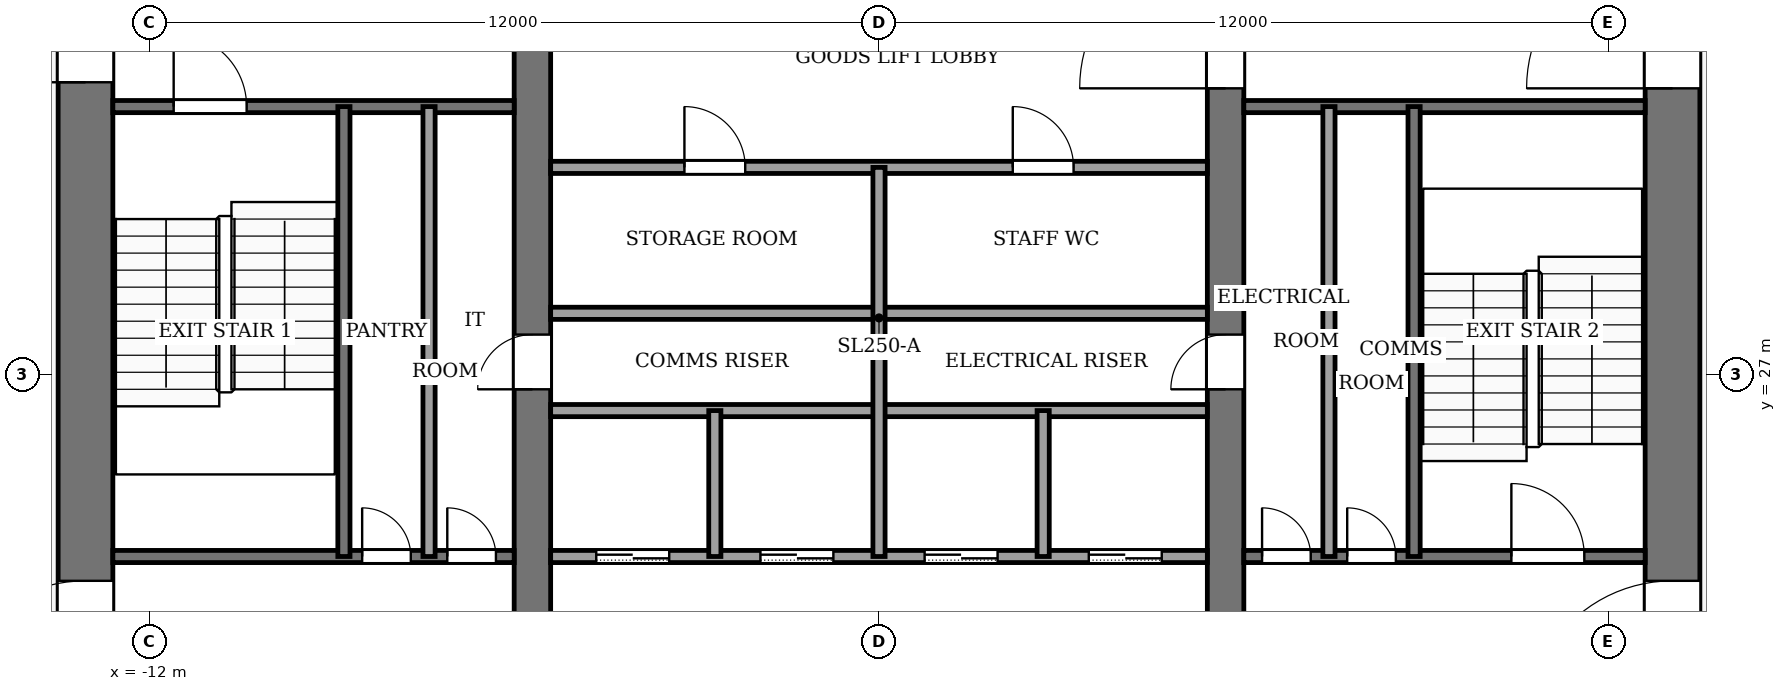
"""IFC4 building model, lengths in metres.
Left out: names, types, materials, properties, quantities, classifications, styles, units other than length and angle.
Written with IfcOpenShell. Run it as: python <this file> out.ifc"""

import sys

from ifc_helpers import new_model, si_unit, direction, frame, frame_2d, origin, place, context, subcontext, project, spatial, rectangle, extrude, element, fill, save


model = new_model("IFC4")
c1 = context("Model", 3, precision=1e-05, world=origin(), true_north=direction((0.0, 1.0)))
c2 = subcontext(c1, "Body", "Model", "MODEL_VIEW")
j1 = project(units=[si_unit("LENGTHUNIT", "METRE"), si_unit("PLANEANGLEUNIT", "RADIAN")], contexts=[c1])
p1 = place(None, origin())
s1 = spatial("IfcSite", under=j1, at=p1, CompositionType="ELEMENT")
p2 = place(p1, origin())
s2 = spatial("IfcBuilding", under=s1, at=p2, CompositionType="ELEMENT")
p3 = place(p2, frame((0.0, 0.0, 218.0)))
s3 = spatial("IfcBuildingStorey", under=s2, at=p3, CompositionType="ELEMENT", Elevation=218.0)
p4 = place(p3, frame((-13.05, 18.4, -0.13), z_axis=(0.0, 0.0, 1.0), x_axis=(0.0, 1.0, 0.0)))
e1 = element("IfcWall", 1, at=p4, inside=s3, PredefinedType="SHEAR", context=c2, shape_type="SweptSolid", body=[
    extrude(rectangle(XDim=19.2, YDim=0.9, at=frame_2d((9.6, 0.0))), origin(), (0.0, 0.0, 1.0), 4.0),
])
p5 = place(p4, frame((2.8, 0.0, 0.13)))
e2 = element("IfcOpeningElement", 2, at=p5, cuts=e1, PredefinedType="OPENING", context=c2, shape_type="SweptSolid", body=[
    extrude(rectangle(XDim=2.4, YDim=2.4, at=frame_2d((1.2, 1.2))), frame((0.0, 0.46, 0.0), z_axis=(0.0, -1.0, 0.0), x_axis=(1.0, 0.0, 0.0)), (0.0, 0.0, 1.0), 0.92),
])
p6 = place(p4, frame((13.4, 0.0, 0.13)))
e3 = element("IfcOpeningElement", 3, at=p6, cuts=e1, PredefinedType="OPENING", context=c2, shape_type="SweptSolid", body=[
    extrude(rectangle(XDim=1.4, YDim=2.2, at=frame_2d((0.7, 1.1))), frame((0.0, 0.46, 0.0), z_axis=(0.0, -1.0, 0.0), x_axis=(1.0, 0.0, 0.0)), (0.0, 0.0, 1.0), 0.92),
])
p7 = place(p3, frame((13.05, 18.4, -0.13), z_axis=(0.0, 0.0, 1.0), x_axis=(0.0, 1.0, 0.0)))
e4 = element("IfcWall", 4, at=p7, inside=s3, PredefinedType="SHEAR", context=c2, shape_type="SweptSolid", body=[
    extrude(rectangle(XDim=19.2, YDim=0.9, at=frame_2d((9.6, 0.0))), origin(), (0.0, 0.0, 1.0), 4.0),
])
p8 = place(p7, frame((2.8, 0.0, 0.13)))
e5 = element("IfcOpeningElement", 5, at=p8, cuts=e4, PredefinedType="OPENING", context=c2, shape_type="SweptSolid", body=[
    extrude(rectangle(XDim=2.4, YDim=2.4, at=frame_2d((1.2, 1.2))), frame((0.0, 0.46, 0.0), z_axis=(0.0, -1.0, 0.0), x_axis=(1.0, 0.0, 0.0)), (0.0, 0.0, 1.0), 0.92),
])
p9 = place(p7, frame((13.3, 0.0, 0.13)))
e6 = element("IfcOpeningElement", 6, at=p9, cuts=e4, PredefinedType="OPENING", context=c2, shape_type="SweptSolid", body=[
    extrude(rectangle(XDim=2.4, YDim=2.4, at=frame_2d((1.2, 1.2))), frame((0.0, 0.46, 0.0), z_axis=(0.0, -1.0, 0.0), x_axis=(1.0, 0.0, 0.0)), (0.0, 0.0, 1.0), 0.92),
])
p10 = place(p3, frame((-5.7, 18.4, -0.13), z_axis=(0.0, 0.0, 1.0), x_axis=(0.0, 1.0, 0.0)))
e7 = element("IfcWall", 7, at=p10, inside=s3, PredefinedType="SHEAR", context=c2, shape_type="SweptSolid", body=[
    extrude(rectangle(XDim=19.2, YDim=0.6, at=frame_2d((9.6, 0.0))), origin(), (0.0, 0.0, 1.0), 4.0),
])
p11 = place(p10, frame((8.35, 0.0, 0.13)))
e8 = element("IfcOpeningElement", 8, at=p11, cuts=e7, PredefinedType="OPENING", context=c2, shape_type="SweptSolid", body=[
    extrude(rectangle(XDim=0.9, YDim=2.1, at=frame_2d((0.45, 1.05))), frame((0.0, 0.31, 0.0), z_axis=(0.0, -1.0, 0.0), x_axis=(1.0, 0.0, 0.0)), (0.0, 0.0, 1.0), 0.62),
])
p12 = place(p3, frame((5.7, 18.4, -0.13), z_axis=(0.0, 0.0, 1.0), x_axis=(0.0, 1.0, 0.0)))
e9 = element("IfcWall", 9, at=p12, inside=s3, PredefinedType="SHEAR", context=c2, shape_type="SweptSolid", body=[
    extrude(rectangle(XDim=19.2, YDim=0.6, at=frame_2d((9.6, 0.0))), origin(), (0.0, 0.0, 1.0), 4.0),
])
p13 = place(p12, frame((8.35, 0.0, 0.13)))
e10 = element("IfcOpeningElement", 10, at=p13, cuts=e9, PredefinedType="OPENING", context=c2, shape_type="SweptSolid", body=[
    extrude(rectangle(XDim=0.9, YDim=2.1, at=frame_2d((0.45, 1.05))), frame((0.0, 0.31, 0.0), z_axis=(0.0, -1.0, 0.0), x_axis=(1.0, 0.0, 0.0)), (0.0, 0.0, 1.0), 0.62),
])
p14 = place(p12, frame((13.3, 0.0, 0.13)))
e11 = element("IfcOpeningElement", 11, at=p14, cuts=e9, PredefinedType="OPENING", context=c2, shape_type="SweptSolid", body=[
    extrude(rectangle(XDim=2.4, YDim=2.4, at=frame_2d((1.2, 1.2))), frame((0.0, 0.31, 0.0), z_axis=(0.0, -1.0, 0.0), x_axis=(1.0, 0.0, 0.0)), (0.0, 0.0, 1.0), 0.62),
])
p15 = place(p3, frame((-12.6, 24.0, 0.0), z_axis=(0.0, 0.0, 1.0), x_axis=(1.0, 0.0, 0.0)))
e12 = element("IfcWall", 12, at=p15, inside=s3, PredefinedType="PARTITIONING", context=c2, shape_type="SweptSolid", body=[
    extrude(rectangle(XDim=6.6, YDim=0.2, at=frame_2d((3.3, 0.0))), origin(), (0.0, 0.0, 1.0), 3.87),
])
p16 = place(p15, frame((4.1, 0.0, 0.0)))
e13 = element("IfcOpeningElement", 13, at=p16, cuts=e12, PredefinedType="OPENING", context=c2, shape_type="SweptSolid", body=[
    extrude(rectangle(XDim=0.8, YDim=2.1, at=frame_2d((0.4, 1.05))), frame((0.0, 0.11, 0.0), z_axis=(0.0, -1.0, 0.0), x_axis=(1.0, 0.0, 0.0)), (0.0, 0.0, 1.0), 0.22),
])
p17 = place(p15, frame((5.5, 0.0, 0.0)))
e14 = element("IfcOpeningElement", 14, at=p17, cuts=e12, PredefinedType="OPENING", context=c2, shape_type="SweptSolid", body=[
    extrude(rectangle(XDim=0.8, YDim=2.1, at=frame_2d((0.4, 1.05))), frame((0.0, 0.11, 0.0), z_axis=(0.0, -1.0, 0.0), x_axis=(1.0, 0.0, 0.0)), (0.0, 0.0, 1.0), 0.22),
])
p18 = place(p3, frame((-5.4, 24.0, 0.0), z_axis=(0.0, 0.0, 1.0), x_axis=(1.0, 0.0, 0.0)))
e15 = element("IfcWall", 15, at=p18, inside=s3, PredefinedType="PARTITIONING", context=c2, shape_type="SweptSolid", body=[
    extrude(rectangle(XDim=10.8, YDim=0.2, at=frame_2d((5.4, 0.0))), origin(), (0.0, 0.0, 1.0), 3.87),
])
p19 = place(p18, frame((0.75, 0.0, 0.0)))
e16 = element("IfcOpeningElement", 16, at=p19, cuts=e15, PredefinedType="OPENING", context=c2, shape_type="SweptSolid", body=[
    extrude(rectangle(XDim=1.2, YDim=2.2, at=frame_2d((0.6, 1.1))), frame((0.0, 0.11, 0.0), z_axis=(0.0, -1.0, 0.0), x_axis=(1.0, 0.0, 0.0)), (0.0, 0.0, 1.0), 0.22),
])
p20 = place(p18, frame((3.45, 0.0, 0.0)))
e17 = element("IfcOpeningElement", 17, at=p20, cuts=e15, PredefinedType="OPENING", context=c2, shape_type="SweptSolid", body=[
    extrude(rectangle(XDim=1.2, YDim=2.2, at=frame_2d((0.6, 1.1))), frame((0.0, 0.11, 0.0), z_axis=(0.0, -1.0, 0.0), x_axis=(1.0, 0.0, 0.0)), (0.0, 0.0, 1.0), 0.22),
])
p21 = place(p18, frame((6.15, 0.0, 0.0)))
e18 = element("IfcOpeningElement", 18, at=p21, cuts=e15, PredefinedType="OPENING", context=c2, shape_type="SweptSolid", body=[
    extrude(rectangle(XDim=1.2, YDim=2.2, at=frame_2d((0.6, 1.1))), frame((0.0, 0.11, 0.0), z_axis=(0.0, -1.0, 0.0), x_axis=(1.0, 0.0, 0.0)), (0.0, 0.0, 1.0), 0.22),
])
p22 = place(p18, frame((8.85, 0.0, 0.0)))
e19 = element("IfcOpeningElement", 19, at=p22, cuts=e15, PredefinedType="OPENING", context=c2, shape_type="SweptSolid", body=[
    extrude(rectangle(XDim=1.2, YDim=2.2, at=frame_2d((0.6, 1.1))), frame((0.0, 0.11, 0.0), z_axis=(0.0, -1.0, 0.0), x_axis=(1.0, 0.0, 0.0)), (0.0, 0.0, 1.0), 0.22),
])
p23 = place(p3, frame((6.0, 24.0, 0.0), z_axis=(0.0, 0.0, 1.0), x_axis=(1.0, 0.0, 0.0)))
e20 = element("IfcWall", 20, at=p23, inside=s3, PredefinedType="PARTITIONING", context=c2, shape_type="SweptSolid", body=[
    extrude(rectangle(XDim=6.6, YDim=0.2, at=frame_2d((3.3, 0.0))), origin(), (0.0, 0.0, 1.0), 3.87),
])
p24 = place(p23, frame((0.3, 0.0, 0.0)))
e21 = element("IfcOpeningElement", 21, at=p24, cuts=e20, PredefinedType="OPENING", context=c2, shape_type="SweptSolid", body=[
    extrude(rectangle(XDim=0.8, YDim=2.1, at=frame_2d((0.4, 1.05))), frame((0.0, 0.11, 0.0), z_axis=(0.0, -1.0, 0.0), x_axis=(1.0, 0.0, 0.0)), (0.0, 0.0, 1.0), 0.22),
])
p25 = place(p23, frame((1.7, 0.0, 0.0)))
e22 = element("IfcOpeningElement", 22, at=p25, cuts=e20, PredefinedType="OPENING", context=c2, shape_type="SweptSolid", body=[
    extrude(rectangle(XDim=0.8, YDim=2.1, at=frame_2d((0.4, 1.05))), frame((0.0, 0.11, 0.0), z_axis=(0.0, -1.0, 0.0), x_axis=(1.0, 0.0, 0.0)), (0.0, 0.0, 1.0), 0.22),
])
p26 = place(p23, frame((4.4, 0.0, 0.0)))
e23 = element("IfcOpeningElement", 23, at=p26, cuts=e20, PredefinedType="OPENING", context=c2, shape_type="SweptSolid", body=[
    extrude(rectangle(XDim=1.2, YDim=2.2, at=frame_2d((0.6, 1.1))), frame((0.0, 0.11, 0.0), z_axis=(0.0, -1.0, 0.0), x_axis=(1.0, 0.0, 0.0)), (0.0, 0.0, 1.0), 0.22),
])
for number, where, z_axis, x_axis in (
    (24, (-5.4, 26.4, 0.0), (0.0, 0.0, 1.0), (1.0, 0.0, 0.0)),
    (25, (-5.4, 28.0, 0.0), (0.0, 0.0, 1.0), (1.0, 0.0, 0.0)),
):
    element("IfcWall", number, at=place(p3, frame(where, z_axis=z_axis, x_axis=x_axis)), inside=s3, PredefinedType="PARTITIONING", context=c2, shape_type="SweptSolid", body=[
        extrude(rectangle(XDim=10.8, YDim=0.2, at=frame_2d((5.4, 0.0))), origin(), (0.0, 0.0, 1.0), 3.87),
    ])
p27 = place(p3, frame((-5.4, 30.4, 0.0), z_axis=(0.0, 0.0, 1.0), x_axis=(1.0, 0.0, 0.0)))
e26 = element("IfcWall", 26, at=p27, inside=s3, PredefinedType="PARTITIONING", context=c2, shape_type="SweptSolid", body=[
    extrude(rectangle(XDim=10.8, YDim=0.2, at=frame_2d((5.4, 0.0))), origin(), (0.0, 0.0, 1.0), 3.87),
])
p28 = place(p27, frame((2.2, 0.0, 0.0)))
e27 = element("IfcOpeningElement", 27, at=p28, cuts=e26, PredefinedType="OPENING", context=c2, shape_type="SweptSolid", body=[
    extrude(rectangle(XDim=1.0, YDim=2.1, at=frame_2d((0.5, 1.05))), frame((0.0, 0.11, 0.0), z_axis=(0.0, -1.0, 0.0), x_axis=(1.0, 0.0, 0.0)), (0.0, 0.0, 1.0), 0.22),
])
p29 = place(p27, frame((7.6, 0.0, 0.0)))
e28 = element("IfcOpeningElement", 28, at=p29, cuts=e26, PredefinedType="OPENING", context=c2, shape_type="SweptSolid", body=[
    extrude(rectangle(XDim=1.0, YDim=2.1, at=frame_2d((0.5, 1.05))), frame((0.0, 0.11, 0.0), z_axis=(0.0, -1.0, 0.0), x_axis=(1.0, 0.0, 0.0)), (0.0, 0.0, 1.0), 0.22),
])
p30 = place(p3, frame((-12.6, 31.4, 0.0), z_axis=(0.0, 0.0, 1.0), x_axis=(1.0, 0.0, 0.0)))
e29 = element("IfcWall", 29, at=p30, inside=s3, PredefinedType="PARTITIONING", context=c2, shape_type="SweptSolid", body=[
    extrude(rectangle(XDim=6.6, YDim=0.2, at=frame_2d((3.3, 0.0))), origin(), (0.0, 0.0, 1.0), 3.87),
])
p31 = place(p30, frame((1.0, 0.0, 0.0)))
e30 = element("IfcOpeningElement", 30, at=p31, cuts=e29, PredefinedType="OPENING", context=c2, shape_type="SweptSolid", body=[
    extrude(rectangle(XDim=1.2, YDim=2.2, at=frame_2d((0.6, 1.1))), frame((0.0, 0.11, 0.0), z_axis=(0.0, -1.0, 0.0), x_axis=(1.0, 0.0, 0.0)), (0.0, 0.0, 1.0), 0.22),
])
p32 = place(p3, frame((6.0, 31.4, 0.0), z_axis=(0.0, 0.0, 1.0), x_axis=(1.0, 0.0, 0.0)))
e31 = element("IfcWall", 31, at=p32, inside=s3, PredefinedType="PARTITIONING", context=c2, shape_type="SweptSolid", body=[
    extrude(rectangle(XDim=6.6, YDim=0.2, at=frame_2d((3.3, 0.0))), origin(), (0.0, 0.0, 1.0), 3.87),
])
for number, where, z_axis, x_axis in (
    (32, (-8.8, 24.0, 0.0), (0.0, 0.0, 1.0), (0.0, 1.0, 0.0)),
    (33, (-7.4, 24.0, 0.0), (0.0, 0.0, 1.0), (0.0, 1.0, 0.0)),
):
    element("IfcWall", number, at=place(p3, frame(where, z_axis=z_axis, x_axis=x_axis)), inside=s3, PredefinedType="PARTITIONING", context=c2, shape_type="SweptSolid", body=[
        extrude(rectangle(XDim=7.4, YDim=0.2, at=frame_2d((3.7, 0.0))), origin(), (0.0, 0.0, 1.0), 3.87),
    ])
p33 = place(p3, frame((-2.7, 24.0, 0.0), z_axis=(0.0, 0.0, 1.0), x_axis=(0.0, 1.0, 0.0)))
e34 = element("IfcWall", 34, at=p33, inside=s3, PredefinedType="PARTITIONING", context=c2, shape_type="SweptSolid", body=[
    extrude(rectangle(XDim=2.4, YDim=0.2, at=frame_2d((1.2, 0.0))), origin(), (0.0, 0.0, 1.0), 3.87),
])
p34 = place(p3, frame((0.0, 24.0, 0.0), z_axis=(0.0, 0.0, 1.0), x_axis=(0.0, 1.0, 0.0)))
e35 = element("IfcWall", 35, at=p34, inside=s3, PredefinedType="PARTITIONING", context=c2, shape_type="SweptSolid", body=[
    extrude(rectangle(XDim=6.4, YDim=0.2, at=frame_2d((3.2, 0.0))), origin(), (0.0, 0.0, 1.0), 3.87),
])
p35 = place(p3, frame((2.7, 24.0, 0.0), z_axis=(0.0, 0.0, 1.0), x_axis=(0.0, 1.0, 0.0)))
e36 = element("IfcWall", 36, at=p35, inside=s3, PredefinedType="PARTITIONING", context=c2, shape_type="SweptSolid", body=[
    extrude(rectangle(XDim=2.4, YDim=0.2, at=frame_2d((1.2, 0.0))), origin(), (0.0, 0.0, 1.0), 3.87),
])
for number, where, z_axis, x_axis in (
    (37, (7.4, 24.0, 0.0), (0.0, 0.0, 1.0), (0.0, 1.0, 0.0)),
    (38, (8.8, 24.0, 0.0), (0.0, 0.0, 1.0), (0.0, 1.0, 0.0)),
):
    element("IfcWall", number, at=place(p3, frame(where, z_axis=z_axis, x_axis=x_axis)), inside=s3, PredefinedType="PARTITIONING", context=c2, shape_type="SweptSolid", body=[
        extrude(rectangle(XDim=7.4, YDim=0.2, at=frame_2d((3.7, 0.0))), origin(), (0.0, 0.0, 1.0), 3.87),
    ])
p36 = place(p19, origin())
e39 = element("IfcDoor", 39, at=p36, inside=s3, OperationType="SLIDING_TO_LEFT", PredefinedType="DOOR", context=c2, shape_type="SweptSolid", body=[
    extrude(rectangle(XDim=1.2, YDim=2.2, at=frame_2d((0.6, 1.1))), frame((0.0, 0.025, 0.0), z_axis=(0.0, -1.0, 0.0), x_axis=(1.0, 0.0, 0.0)), (0.0, 0.0, 1.0), 0.05),
])
fill(e16, e39)
p37 = place(p20, origin())
e40 = element("IfcDoor", 40, at=p37, inside=s3, OperationType="SLIDING_TO_LEFT", PredefinedType="DOOR", context=c2, shape_type="SweptSolid", body=[
    extrude(rectangle(XDim=1.2, YDim=2.2, at=frame_2d((0.6, 1.1))), frame((0.0, 0.025, 0.0), z_axis=(0.0, -1.0, 0.0), x_axis=(1.0, 0.0, 0.0)), (0.0, 0.0, 1.0), 0.05),
])
fill(e17, e40)
p38 = place(p21, origin())
e41 = element("IfcDoor", 41, at=p38, inside=s3, OperationType="SLIDING_TO_LEFT", PredefinedType="DOOR", context=c2, shape_type="SweptSolid", body=[
    extrude(rectangle(XDim=1.2, YDim=2.2, at=frame_2d((0.6, 1.1))), frame((0.0, 0.025, 0.0), z_axis=(0.0, -1.0, 0.0), x_axis=(1.0, 0.0, 0.0)), (0.0, 0.0, 1.0), 0.05),
])
fill(e18, e41)
p39 = place(p22, origin())
e42 = element("IfcDoor", 42, at=p39, inside=s3, OperationType="SLIDING_TO_LEFT", PredefinedType="DOOR", context=c2, shape_type="SweptSolid", body=[
    extrude(rectangle(XDim=1.2, YDim=2.2, at=frame_2d((0.6, 1.1))), frame((0.0, 0.025, 0.0), z_axis=(0.0, -1.0, 0.0), x_axis=(1.0, 0.0, 0.0)), (0.0, 0.0, 1.0), 0.05),
])
fill(e19, e42)
p40 = place(p28, origin())
e43 = element("IfcDoor", 43, at=p40, inside=s3, OperationType="SINGLE_SWING_LEFT", PredefinedType="DOOR", context=c2, shape_type="SweptSolid", body=[
    extrude(rectangle(XDim=1.0, YDim=2.1, at=frame_2d((0.5, 1.05))), frame((0.0, 0.025, 0.0), z_axis=(0.0, -1.0, 0.0), x_axis=(1.0, 0.0, 0.0)), (0.0, 0.0, 1.0), 0.05),
])
fill(e27, e43)
p41 = place(p29, origin())
e44 = element("IfcDoor", 44, at=p41, inside=s3, OperationType="SINGLE_SWING_RIGHT", PredefinedType="DOOR", context=c2, shape_type="SweptSolid", body=[
    extrude(rectangle(XDim=1.0, YDim=2.1, at=frame_2d((0.5, 1.05))), frame((0.0, 0.025, 0.0), z_axis=(0.0, -1.0, 0.0), x_axis=(1.0, 0.0, 0.0)), (0.0, 0.0, 1.0), 0.05),
])
fill(e28, e44)
p42 = place(p16, origin())
e45 = element("IfcDoor", 45, at=p42, inside=s3, OperationType="SINGLE_SWING_RIGHT", PredefinedType="DOOR", context=c2, shape_type="SweptSolid", body=[
    extrude(rectangle(XDim=0.8, YDim=2.1, at=frame_2d((0.4, 1.05))), frame((0.0, 0.025, 0.0), z_axis=(0.0, -1.0, 0.0), x_axis=(1.0, 0.0, 0.0)), (0.0, 0.0, 1.0), 0.05),
])
fill(e13, e45)
p43 = place(p17, origin())
e46 = element("IfcDoor", 46, at=p43, inside=s3, OperationType="SINGLE_SWING_LEFT", PredefinedType="DOOR", context=c2, shape_type="SweptSolid", body=[
    extrude(rectangle(XDim=0.8, YDim=2.1, at=frame_2d((0.4, 1.05))), frame((0.0, 0.025, 0.0), z_axis=(0.0, -1.0, 0.0), x_axis=(1.0, 0.0, 0.0)), (0.0, 0.0, 1.0), 0.05),
])
fill(e14, e46)
p44 = place(p24, origin())
e47 = element("IfcDoor", 47, at=p44, inside=s3, OperationType="SINGLE_SWING_RIGHT", PredefinedType="DOOR", context=c2, shape_type="SweptSolid", body=[
    extrude(rectangle(XDim=0.8, YDim=2.1, at=frame_2d((0.4, 1.05))), frame((0.0, 0.025, 0.0), z_axis=(0.0, -1.0, 0.0), x_axis=(1.0, 0.0, 0.0)), (0.0, 0.0, 1.0), 0.05),
])
fill(e21, e47)
p45 = place(p25, origin())
e48 = element("IfcDoor", 48, at=p45, inside=s3, OperationType="SINGLE_SWING_LEFT", PredefinedType="DOOR", context=c2, shape_type="SweptSolid", body=[
    extrude(rectangle(XDim=0.8, YDim=2.1, at=frame_2d((0.4, 1.05))), frame((0.0, 0.025, 0.0), z_axis=(0.0, -1.0, 0.0), x_axis=(1.0, 0.0, 0.0)), (0.0, 0.0, 1.0), 0.05),
])
fill(e22, e48)
p46 = place(p11, origin())
e49 = element("IfcDoor", 49, at=p46, inside=s3, OperationType="SINGLE_SWING_LEFT", PredefinedType="DOOR", context=c2, shape_type="SweptSolid", body=[
    extrude(rectangle(XDim=0.9, YDim=2.1, at=frame_2d((0.45, 1.05))), frame((0.0, 0.025, 0.0), z_axis=(0.0, -1.0, 0.0), x_axis=(1.0, 0.0, 0.0)), (0.0, 0.0, 1.0), 0.05),
])
fill(e8, e49)
p47 = place(p13, origin())
e50 = element("IfcDoor", 50, at=p47, inside=s3, OperationType="SINGLE_SWING_RIGHT", PredefinedType="DOOR", context=c2, shape_type="SweptSolid", body=[
    extrude(rectangle(XDim=0.9, YDim=2.1, at=frame_2d((0.45, 1.05))), frame((0.0, 0.025, 0.0), z_axis=(0.0, -1.0, 0.0), x_axis=(1.0, 0.0, 0.0)), (0.0, 0.0, 1.0), 0.05),
])
fill(e10, e50)
p48 = place(p31, origin())
e51 = element("IfcDoor", 51, at=p48, inside=s3, OperationType="SINGLE_SWING_RIGHT", PredefinedType="DOOR", context=c2, shape_type="SweptSolid", body=[
    extrude(rectangle(XDim=1.2, YDim=2.2, at=frame_2d((0.6, 1.1))), frame((0.0, 0.025, 0.0), z_axis=(0.0, -1.0, 0.0), x_axis=(1.0, 0.0, 0.0)), (0.0, 0.0, 1.0), 0.05),
])
fill(e30, e51)
p49 = place(p26, origin())
e52 = element("IfcDoor", 52, at=p49, inside=s3, OperationType="SINGLE_SWING_LEFT", PredefinedType="DOOR", context=c2, shape_type="SweptSolid", body=[
    extrude(rectangle(XDim=1.2, YDim=2.2, at=frame_2d((0.6, 1.1))), frame((0.0, 0.025, 0.0), z_axis=(0.0, -1.0, 0.0), x_axis=(1.0, 0.0, 0.0)), (0.0, 0.0, 1.0), 0.05),
])
fill(e23, e52)
p50 = place(p14, origin())
e53 = element("IfcDoor", 53, at=p50, inside=s3, OperationType="DOUBLE_DOOR_SINGLE_SWING", PredefinedType="DOOR", context=c2, shape_type="SweptSolid", body=[
    extrude(rectangle(XDim=2.4, YDim=2.4, at=frame_2d((1.2, 1.2))), frame((0.0, 0.025, 0.0), z_axis=(0.0, -1.0, 0.0), x_axis=(1.0, 0.0, 0.0)), (0.0, 0.0, 1.0), 0.05),
])
fill(e11, e53)
p51 = place(p5, origin())
e54 = element("IfcDoor", 54, at=p51, inside=s3, OperationType="DOUBLE_DOOR_SINGLE_SWING", PredefinedType="DOOR", context=c2, shape_type="SweptSolid", body=[
    extrude(rectangle(XDim=2.4, YDim=2.4, at=frame_2d((1.2, 1.2))), frame((0.0, 0.025, 0.0), z_axis=(0.0, -1.0, 0.0), x_axis=(1.0, 0.0, 0.0)), (0.0, 0.0, 1.0), 0.05),
])
fill(e2, e54)
p52 = place(p8, origin())
e55 = element("IfcDoor", 55, at=p52, inside=s3, OperationType="DOUBLE_DOOR_SINGLE_SWING", PredefinedType="DOOR", context=c2, shape_type="SweptSolid", body=[
    extrude(rectangle(XDim=2.4, YDim=2.4, at=frame_2d((1.2, 1.2))), frame((0.0, 0.025, 0.0), z_axis=(0.0, -1.0, 0.0), x_axis=(1.0, 0.0, 0.0)), (0.0, 0.0, 1.0), 0.05),
])
fill(e5, e55)
p53 = place(p9, origin())
e56 = element("IfcDoor", 56, at=p53, inside=s3, OperationType="DOUBLE_DOOR_SINGLE_SWING", PredefinedType="DOOR", context=c2, shape_type="SweptSolid", body=[
    extrude(rectangle(XDim=2.4, YDim=2.4, at=frame_2d((1.2, 1.2))), frame((0.0, 0.025, 0.0), z_axis=(0.0, -1.0, 0.0), x_axis=(1.0, 0.0, 0.0)), (0.0, 0.0, 1.0), 0.05),
])
fill(e6, e56)
p54 = place(p6, origin())
e57 = element("IfcDoor", 57, at=p54, inside=s3, OperationType="SINGLE_SWING_RIGHT", PredefinedType="DOOR", context=c2, shape_type="SweptSolid", body=[
    extrude(rectangle(XDim=1.4, YDim=2.2, at=frame_2d((0.7, 1.1))), frame((0.0, 0.025, 0.0), z_axis=(0.0, -1.0, 0.0), x_axis=(1.0, 0.0, 0.0)), (0.0, 0.0, 1.0), 0.05),
])
fill(e3, e57)
save(model, sys.argv[1])
